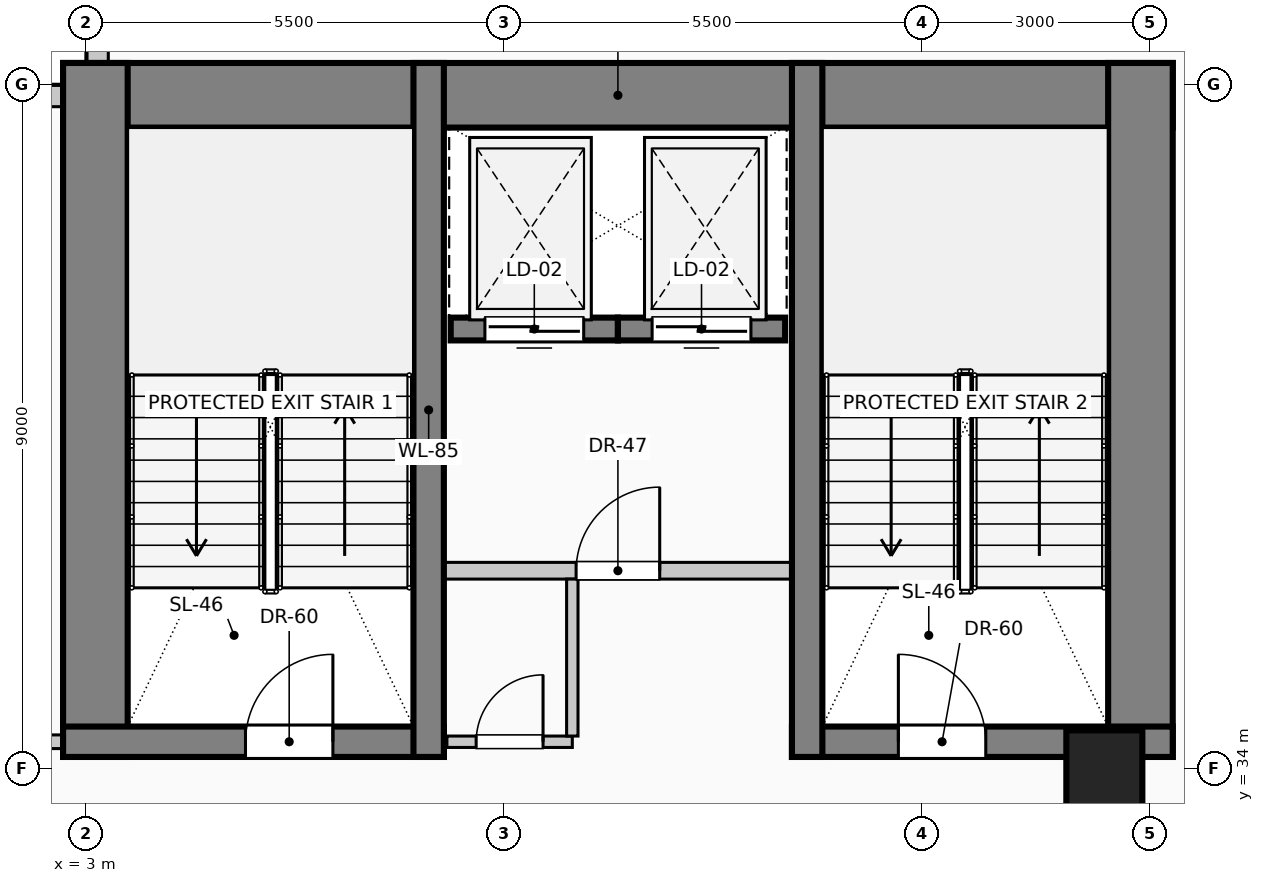
"""IFC4 building model, lengths in metres.
Left out: names, types, materials, properties, quantities, classifications, styles, units other than length and angle.
Written with IfcOpenShell. Run it as: python <this file> out.ifc"""

import sys

from ifc_helpers import new_model, si_unit, direction, frame, frame_2d, origin, origin_2d, place, context, subcontext, project, spatial, rectangle, circle, extrude, element, fill, save


model = new_model("IFC4")
c1 = context("Model", 3, precision=1e-05, world=origin(), true_north=direction((0.0, 1.0)))
c2 = subcontext(c1, "Body", "Model", "MODEL_VIEW")
j1 = project(units=[si_unit("LENGTHUNIT", "METRE"), si_unit("PLANEANGLEUNIT", "RADIAN")], contexts=[c1])
p1 = place(None, origin())
s1 = spatial("IfcSite", under=j1, at=p1, CompositionType="ELEMENT")
p2 = place(p1, origin())
s2 = spatial("IfcBuilding", under=s1, at=p2, CompositionType="ELEMENT")
p3 = place(p2, frame((0.0, 0.0, 112.6)))
s3 = spatial("IfcBuildingStorey", under=s2, at=p3, CompositionType="ELEMENT", Elevation=112.6)
p4 = place(p3, frame((2.7, 42.855, 0.0), z_axis=(0.0, 0.0, 1.0), x_axis=(1.0, 0.0, 0.0)))
e1 = element("IfcWall", 1, at=p4, inside=s3, PredefinedType="SHEAR", context=c2, shape_type="SweptSolid", body=[
    extrude(rectangle(XDim=14.6, YDim=0.85, at=frame_2d((7.3, 0.0))), origin(), (0.0, 0.0, 1.0), 4.0),
])
for number, where, z_axis, x_axis in (
    (2, (3.125, 34.15, 0.0), (0.0, 0.0, 1.0), (0.0, 1.0, 0.0)),
    (3, (16.875, 34.15, 0.0), (0.0, 0.0, 1.0), (0.0, 1.0, 0.0)),
):
    element("IfcWall", number, at=place(p3, frame(where, z_axis=z_axis, x_axis=x_axis)), inside=s3, PredefinedType="SHEAR", context=c2, shape_type="SweptSolid", body=[
        extrude(rectangle(XDim=9.13, YDim=0.85, at=frame_2d((4.565, 0.0))), origin(), (0.0, 0.0, 1.0), 4.0),
    ])
p5 = place(p3, frame((2.7, 34.35, 0.0), z_axis=(0.0, 0.0, 1.0), x_axis=(1.0, 0.0, 0.0)))
e4 = element("IfcWall", 4, at=p5, inside=s3, PredefinedType="SHEAR", context=c2, shape_type="SweptSolid", body=[
    extrude(rectangle(XDim=5.01, YDim=0.4, at=frame_2d((2.505, 0.0))), origin(), (0.0, 0.0, 1.0), 4.0),
])
p6 = place(p5, frame((2.4, 0.0, 0.0)))
e5 = element("IfcOpeningElement", 5, at=p6, cuts=e4, PredefinedType="OPENING", context=c2, shape_type="SweptSolid", body=[
    extrude(rectangle(XDim=1.15, YDim=2.2, at=frame_2d((0.575, 1.1))), frame((0.0, 0.21, 0.0), z_axis=(0.0, -1.0, 0.0), x_axis=(1.0, 0.0, 0.0)), (0.0, 0.0, 1.0), 0.42),
])
p7 = place(p3, frame((12.29, 34.35, 0.0), z_axis=(0.0, 0.0, 1.0), x_axis=(1.0, 0.0, 0.0)))
e6 = element("IfcWall", 6, at=p7, inside=s3, PredefinedType="SHEAR", context=c2, shape_type="SweptSolid", body=[
    extrude(rectangle(XDim=5.01, YDim=0.4, at=frame_2d((2.505, 0.0))), origin(), (0.0, 0.0, 1.0), 4.0),
])
p8 = place(p7, frame((1.4, 0.0, 0.0)))
e7 = element("IfcOpeningElement", 7, at=p8, cuts=e6, PredefinedType="OPENING", context=c2, shape_type="SweptSolid", body=[
    extrude(rectangle(XDim=1.15, YDim=2.2, at=frame_2d((0.575, 1.1))), frame((0.0, 0.21, 0.0), z_axis=(0.0, -1.0, 0.0), x_axis=(1.0, 0.0, 0.0)), (0.0, 0.0, 1.0), 0.42),
])
for number, where, z_axis, x_axis in (
    (8, (7.51, 34.15, 0.0), (0.0, 0.0, 1.0), (0.0, 1.0, 0.0)),
    (9, (12.49, 34.15, 0.0), (0.0, 0.0, 1.0), (0.0, 1.0, 0.0)),
):
    element("IfcWall", number, at=place(p3, frame(where, z_axis=z_axis, x_axis=x_axis)), inside=s3, PredefinedType="SHEAR", context=c2, shape_type="SweptSolid", body=[
        extrude(rectangle(XDim=9.13, YDim=0.4, at=frame_2d((4.565, 0.0))), origin(), (0.0, 0.0, 1.0), 4.0),
    ])
p9 = place(p3, frame((16.4, 34.0, 0.0), z_axis=(0.0, 0.0, 1.0), x_axis=(1.0, 0.0, 0.0)))
e10 = element("IfcColumn", 10, at=p9, inside=s3, PredefinedType="COLUMN", context=c2, shape_type="SweptSolid", body=[
    extrude(circle(Radius=0.5, at=origin_2d()), origin(), (0.0, 0.0, 1.0), 4.0),
])
p10 = place(p3, frame((0.6, 42.845, 0.0), z_axis=(0.0, 0.0, 1.0), x_axis=(1.0, 0.0, 0.0)))
e11 = element("IfcWall", 11, at=p10, inside=s3, PredefinedType="SOLIDWALL", context=c2, shape_type="SweptSolid", body=[
    extrude(rectangle(XDim=2.095, YDim=0.28, at=frame_2d((1.047, 0.0))), origin(), (0.0, 0.0, 1.0), 3.725),
])
p11 = place(p3, frame((3.155, 43.285, 0.0), z_axis=(0.0, 0.0, 1.0), x_axis=(0.0, 1.0, 0.0)))
e12 = element("IfcWall", 12, at=p11, inside=s3, PredefinedType="SOLIDWALL", context=c2, shape_type="SweptSolid", body=[
    extrude(rectangle(XDim=2.115, YDim=0.28, at=frame_2d((1.058, 0.0))), origin(), (0.0, 0.0, 1.0), 3.725),
])
p12 = place(p3, frame((10.0, 39.78, 0.0), z_axis=(0.0, 0.0, 1.0), x_axis=(-1.0, 0.0, 0.0)))
e13 = element("IfcWall", 13, at=p12, inside=s3, PredefinedType="SOLIDWALL", context=c2, shape_type="SweptSolid", body=[
    extrude(rectangle(XDim=2.2, YDim=0.3, at=frame_2d((1.1, 0.0))), origin(), (0.0, 0.0, 1.0), 4.0),
])
p13 = place(p12, frame((0.45, 0.0, 0.0)))
e14 = element("IfcOpeningElement", 14, at=p13, cuts=e13, PredefinedType="OPENING", context=c2, shape_type="SweptSolid", body=[
    extrude(rectangle(XDim=1.3, YDim=2.25, at=frame_2d((0.65, 1.125))), frame((0.0, 0.16, 0.0), z_axis=(0.0, -1.0, 0.0), x_axis=(1.0, 0.0, 0.0)), (0.0, 0.0, 1.0), 0.32),
])
p14 = place(p3, frame((12.2, 39.78, 0.0), z_axis=(0.0, 0.0, 1.0), x_axis=(-1.0, 0.0, 0.0)))
e15 = element("IfcWall", 15, at=p14, inside=s3, PredefinedType="SOLIDWALL", context=c2, shape_type="SweptSolid", body=[
    extrude(rectangle(XDim=2.2, YDim=0.3, at=frame_2d((1.1, 0.0))), origin(), (0.0, 0.0, 1.0), 4.0),
])
p15 = place(p14, frame((0.45, 0.0, 0.0)))
e16 = element("IfcOpeningElement", 16, at=p15, cuts=e15, PredefinedType="OPENING", context=c2, shape_type="SweptSolid", body=[
    extrude(rectangle(XDim=1.3, YDim=2.25, at=frame_2d((0.65, 1.125))), frame((0.0, 0.16, 0.0), z_axis=(0.0, -1.0, 0.0), x_axis=(1.0, 0.0, 0.0)), (0.0, 0.0, 1.0), 0.32),
])
p16 = place(p3, frame((7.51, 36.6, 0.0), z_axis=(0.0, 0.0, 1.0), x_axis=(1.0, 0.0, 0.0)))
e17 = element("IfcWall", 17, at=p16, inside=s3, PredefinedType="PARTITIONING", context=c2, shape_type="SweptSolid", body=[
    extrude(rectangle(XDim=4.98, YDim=0.22, at=frame_2d((2.49, 0.0))), origin(), (0.0, 0.0, 1.0), 3.725),
])
p17 = place(p16, frame((1.94, 0.0, 0.0)))
e18 = element("IfcOpeningElement", 18, at=p17, cuts=e17, PredefinedType="OPENING", context=c2, shape_type="SweptSolid", body=[
    extrude(rectangle(XDim=1.1, YDim=2.2, at=frame_2d((0.55, 1.1))), frame((0.0, 0.12, 0.0), z_axis=(0.0, -1.0, 0.0), x_axis=(1.0, 0.0, 0.0)), (0.0, 0.0, 1.0), 0.24),
])
p18 = place(p3, frame((1.175, 34.35, 0.0), z_axis=(0.0, 0.0, 1.0), x_axis=(1.0, 0.0, 0.0)))
e19 = element("IfcWall", 19, at=p18, inside=s3, PredefinedType="PARTITIONING", context=c2, shape_type="SweptSolid", body=[
    extrude(rectangle(XDim=1.525, YDim=0.18, at=frame_2d((0.762, 0.0))), origin(), (0.0, 0.0, 1.0), 3.725),
])
p19 = place(p3, frame((7.75, 34.35, 0.0), z_axis=(0.0, 0.0, 1.0), x_axis=(1.0, 0.0, 0.0)))
e20 = element("IfcWall", 20, at=p19, inside=s3, PredefinedType="PARTITIONING", context=c2, shape_type="SweptSolid", body=[
    extrude(rectangle(XDim=1.65, YDim=0.15, at=frame_2d((0.825, 0.0))), origin(), (0.0, 0.0, 1.0), 3.725),
])
p20 = place(p19, frame((0.385, 0.0, 0.0)))
e21 = element("IfcOpeningElement", 21, at=p20, cuts=e20, PredefinedType="OPENING", context=c2, shape_type="SweptSolid", body=[
    extrude(rectangle(XDim=0.88, YDim=2.1, at=frame_2d((0.44, 1.05))), frame((0.0, 0.085, 0.0), z_axis=(0.0, -1.0, 0.0), x_axis=(1.0, 0.0, 0.0)), (0.0, 0.0, 1.0), 0.17),
])
p21 = place(p3, frame((9.4, 34.425, 0.0), z_axis=(0.0, 0.0, 1.0), x_axis=(0.0, 1.0, 0.0)))
e22 = element("IfcWall", 22, at=p21, inside=s3, PredefinedType="PARTITIONING", context=c2, shape_type="SweptSolid", body=[
    extrude(rectangle(XDim=2.065, YDim=0.15, at=frame_2d((1.032, 0.0))), origin(), (0.0, 0.0, 1.0), 3.725),
])
p22 = place(p13, origin())
e23 = element("IfcDoor", 23, at=p22, inside=s3, OperationType="SLIDING_TO_LEFT", PredefinedType="DOOR", context=c2, shape_type="SweptSolid", body=[
    extrude(rectangle(XDim=1.3, YDim=2.25, at=frame_2d((0.65, 1.125))), frame((0.0, 0.025, 0.0), z_axis=(0.0, -1.0, 0.0), x_axis=(1.0, 0.0, 0.0)), (0.0, 0.0, 1.0), 0.05),
])
fill(e14, e23)
p23 = place(p15, origin())
e24 = element("IfcDoor", 24, at=p23, inside=s3, OperationType="SLIDING_TO_RIGHT", PredefinedType="DOOR", context=c2, shape_type="SweptSolid", body=[
    extrude(rectangle(XDim=1.3, YDim=2.25, at=frame_2d((0.65, 1.125))), frame((0.0, 0.025, 0.0), z_axis=(0.0, -1.0, 0.0), x_axis=(1.0, 0.0, 0.0)), (0.0, 0.0, 1.0), 0.05),
])
fill(e16, e24)
p24 = place(p6, origin())
e25 = element("IfcDoor", 25, at=p24, inside=s3, OperationType="SINGLE_SWING_RIGHT", PredefinedType="DOOR", context=c2, shape_type="SweptSolid", body=[
    extrude(rectangle(XDim=1.15, YDim=2.2, at=frame_2d((0.575, 1.1))), frame((0.0, 0.025, 0.0), z_axis=(0.0, -1.0, 0.0), x_axis=(1.0, 0.0, 0.0)), (0.0, 0.0, 1.0), 0.05),
])
fill(e5, e25)
p25 = place(p8, origin())
e26 = element("IfcDoor", 26, at=p25, inside=s3, OperationType="SINGLE_SWING_LEFT", PredefinedType="DOOR", context=c2, shape_type="SweptSolid", body=[
    extrude(rectangle(XDim=1.15, YDim=2.2, at=frame_2d((0.575, 1.1))), frame((0.0, 0.025, 0.0), z_axis=(0.0, -1.0, 0.0), x_axis=(1.0, 0.0, 0.0)), (0.0, 0.0, 1.0), 0.05),
])
fill(e7, e26)
p26 = place(p17, origin())
e27 = element("IfcDoor", 27, at=p26, inside=s3, OperationType="SINGLE_SWING_RIGHT", PredefinedType="DOOR", context=c2, shape_type="SweptSolid", body=[
    extrude(rectangle(XDim=1.1, YDim=2.2, at=frame_2d((0.55, 1.1))), frame((0.0, 0.025, 0.0), z_axis=(0.0, -1.0, 0.0), x_axis=(1.0, 0.0, 0.0)), (0.0, 0.0, 1.0), 0.05),
])
fill(e18, e27)
p27 = place(p20, origin())
e28 = element("IfcDoor", 28, at=p27, inside=s3, OperationType="SINGLE_SWING_RIGHT", PredefinedType="DOOR", context=c2, shape_type="SweptSolid", body=[
    extrude(rectangle(XDim=0.88, YDim=2.1, at=frame_2d((0.44, 1.05))), frame((0.0, 0.025, 0.0), z_axis=(0.0, -1.0, 0.0), x_axis=(1.0, 0.0, 0.0)), (0.0, 0.0, 1.0), 0.05),
])
fill(e21, e28)
save(model, sys.argv[1])
